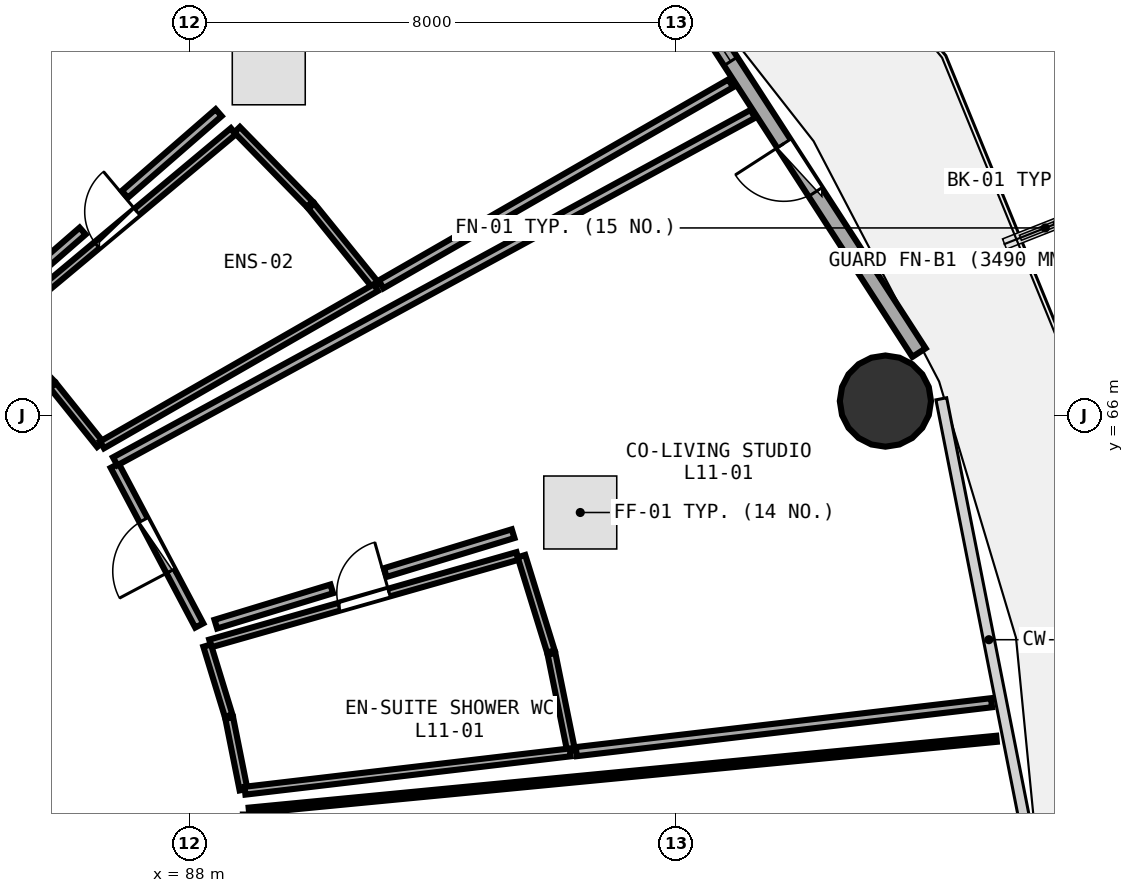
"""IFC4 building model, lengths in metres.
Left out: names, types, materials, properties, quantities, classifications, styles, units other than length and angle.
Written with IfcOpenShell. Run it as: python <this file> out.ifc"""

import sys

from ifc_helpers import new_model, si_unit, direction, frame, frame_2d, origin, origin_2d, place, context, subcontext, project, spatial, rectangle, circle, extrude, element, fill, save


model = new_model("IFC4")
c1 = context("Model", 3, precision=1e-05, world=origin(), true_north=direction((0.0, 1.0)))
c2 = subcontext(c1, "Body", "Model", "MODEL_VIEW")
j1 = project(units=[si_unit("LENGTHUNIT", "METRE"), si_unit("PLANEANGLEUNIT", "RADIAN")], contexts=[c1])
p1 = place(None, origin())
s1 = spatial("IfcSite", under=j1, at=p1, CompositionType="ELEMENT")
p2 = place(p1, origin())
s2 = spatial("IfcBuilding", under=s1, at=p2, CompositionType="ELEMENT")
p3 = place(p2, frame((0.0, 0.0, 45.0)))
s3 = spatial("IfcBuildingStorey", under=s2, at=p3, CompositionType="ELEMENT", Elevation=45.0)
p4 = place(p3, frame((99.447, 66.236, 0.0), z_axis=(0.0, 0.0, 1.0), x_axis=(1.0, 0.0, 0.0)))
e1 = element("IfcColumn", 1, at=p4, inside=s3, PredefinedType="COLUMN", context=c2, shape_type="SweptSolid", body=[
    extrude(circle(Radius=0.75, at=origin_2d()), origin(), (0.0, 0.0, 1.0), 3.75),
])
p5 = place(p3, frame((99.999, 67.033, 0.0), z_axis=(0.0, 0.0, 1.0), x_axis=(-0.543005114258, 0.839729388488, 0.0)))
e2 = element("IfcWall", 2, at=p5, inside=s3, PredefinedType="SOLIDWALL", context=c2, shape_type="SweptSolid", body=[
    extrude(rectangle(XDim=7.938, YDim=0.26, at=frame_2d((3.969, 0.0))), origin(), (0.0, 0.0, 1.0), 3.475),
])
p6 = place(p5, frame((3.144, 0.0, 0.0)))
e3 = element("IfcOpeningElement", 3, at=p6, cuts=e2, PredefinedType="OPENING", context=c2, shape_type="SweptSolid", body=[
    extrude(rectangle(XDim=0.95, YDim=2.1, at=frame_2d((0.475, 1.05))), frame((0.0, 0.14, 0.0), z_axis=(0.0, -1.0, 0.0), x_axis=(1.0, 0.0, 0.0)), (0.0, 0.0, 1.0), 0.28),
])
p7 = place(p5, frame((5.704, 0.0, 0.85)))
e4 = element("IfcOpeningElement", 4, at=p7, cuts=e2, PredefinedType="OPENING", context=c2, shape_type="SweptSolid", body=[
    extrude(rectangle(XDim=1.2, YDim=1.45, at=frame_2d((0.6, 0.725))), frame((0.0, 0.14, 0.0), z_axis=(0.0, -1.0, 0.0), x_axis=(1.0, 0.0, 0.0)), (0.0, 0.0, 1.0), 0.28),
])
p8 = place(p3, frame((88.344, 62.25, 0.0), z_axis=(0.0, 0.0, 1.0), x_axis=(0.961805744602, 0.273732916636, 0.0)))
e5 = element("IfcWall", 5, at=p8, inside=s3, PredefinedType="PLUMBINGWALL", context=c2, shape_type="SweptSolid", body=[
    extrude(rectangle(XDim=5.254, YDim=0.13, at=frame_2d((2.627, 0.0))), origin(), (0.0, 0.0, 1.0), 3.175),
])
p9 = place(p8, frame((2.197, 0.0, 0.0)))
e6 = element("IfcOpeningElement", 6, at=p9, cuts=e5, PredefinedType="OPENING", context=c2, shape_type="SweptSolid", body=[
    extrude(rectangle(XDim=0.86, YDim=2.05, at=frame_2d((0.43, 1.025))), frame((0.0, 0.075, 0.0), z_axis=(0.0, -1.0, 0.0), x_axis=(1.0, 0.0, 0.0)), (0.0, 0.0, 1.0), 0.15),
])
p10 = place(p3, frame((88.162, 62.546, 0.0), z_axis=(0.0, 0.0, 1.0), x_axis=(-0.467566881753, 0.883957697567, 0.0)))
e7 = element("IfcWall", 7, at=p10, inside=s3, PredefinedType="PARTITIONING", context=c2, shape_type="SweptSolid", body=[
    extrude(rectangle(XDim=2.972, YDim=0.15, at=frame_2d((1.486, 0.0))), origin(), (0.0, 0.0, 1.0), 2.875),
])
p11 = place(p10, frame((1.011, 0.0, 0.0)))
e8 = element("IfcOpeningElement", 8, at=p11, cuts=e7, PredefinedType="OPENING", context=c2, shape_type="SweptSolid", body=[
    extrude(rectangle(XDim=0.95, YDim=2.08, at=frame_2d((0.475, 1.04))), frame((0.0, 0.085, 0.0), z_axis=(0.0, -1.0, 0.0), x_axis=(1.0, 0.0, 0.0)), (0.0, 0.0, 1.0), 0.17),
])
p12 = place(p3, frame((84.892, 67.475, 0.0), z_axis=(0.0, 0.0, 1.0), x_axis=(0.767551433238, 0.64098736129, 0.0)))
e9 = element("IfcWall", 9, at=p12, inside=s3, PredefinedType="PLUMBINGWALL", context=c2, shape_type="SweptSolid", body=[
    extrude(rectangle(XDim=4.992, YDim=0.13, at=frame_2d((2.496, 0.0))), origin(), (0.0, 0.0, 1.0), 3.175),
])
p13 = place(p12, frame((2.066, 0.0, 0.0)))
e10 = element("IfcOpeningElement", 10, at=p13, cuts=e9, PredefinedType="OPENING", context=c2, shape_type="SweptSolid", body=[
    extrude(rectangle(XDim=0.86, YDim=2.05, at=frame_2d((0.43, 1.025))), frame((0.0, 0.075, 0.0), z_axis=(0.0, -1.0, 0.0), x_axis=(1.0, 0.0, 0.0)), (0.0, 0.0, 1.0), 0.15),
])
p14 = place(p3, frame((88.89, 59.846, 0.0), z_axis=(0.0, 0.0, 1.0), x_axis=(-0.195959765133, 0.980611936726, 0.0)))
e11 = element("IfcWall", 11, at=p14, inside=s3, PredefinedType="PLUMBINGWALL", context=c2, shape_type="SweptSolid", body=[
    extrude(rectangle(XDim=1.201, YDim=0.13, at=frame_2d((0.601, 0.0))), origin(), (0.0, 0.0, 1.0), 3.48),
])
p15 = place(p3, frame((88.645, 61.062, 0.0), z_axis=(0.0, 0.0, 1.0), x_axis=(-0.292804953119, 0.956172191307, 0.0)))
e12 = element("IfcWall", 12, at=p15, inside=s3, PredefinedType="PLUMBINGWALL", context=c2, shape_type="SweptSolid", body=[
    extrude(rectangle(XDim=1.206, YDim=0.13, at=frame_2d((0.603, 0.0))), origin(), (0.0, 0.0, 1.0), 3.48),
])
p16 = place(p3, frame((93.461, 63.686, 0.0), z_axis=(0.0, 0.0, 1.0), x_axis=(0.295079059694, -0.955472840289, 0.0)))
e13 = element("IfcWall", 13, at=p16, inside=s3, PredefinedType="PLUMBINGWALL", context=c2, shape_type="SweptSolid", body=[
    extrude(rectangle(XDim=1.641, YDim=0.13, at=frame_2d((0.82, 0.0))), origin(), (0.0, 0.0, 1.0), 3.48),
])
p17 = place(p3, frame((93.955, 62.079, 0.0), z_axis=(0.0, 0.0, 1.0), x_axis=(0.198619685617, -0.980076640108, 0.0)))
e14 = element("IfcWall", 14, at=p17, inside=s3, PredefinedType="PLUMBINGWALL", context=c2, shape_type="SweptSolid", body=[
    extrude(rectangle(XDim=1.631, YDim=0.13, at=frame_2d((0.815, 0.0))), origin(), (0.0, 0.0, 1.0), 3.48),
])
p18 = place(p3, frame((94.263, 60.459, 0.0), z_axis=(0.0, 0.0, 1.0), x_axis=(-0.993128310231, -0.117030591804, 0.0)))
e15 = element("IfcWall", 15, at=p18, inside=s3, PredefinedType="PLUMBINGWALL", context=c2, shape_type="SweptSolid", body=[
    extrude(rectangle(XDim=5.386, YDim=0.13, at=frame_2d((2.693, 0.0))), origin(), (0.0, 0.0, 1.0), 3.175),
])
p19 = place(p3, frame((86.779, 65.245, 0.0), z_axis=(0.0, 0.0, 1.0), x_axis=(0.878114235828, 0.478451030761, 0.0)))
e16 = element("IfcWall", 16, at=p19, inside=s3, PredefinedType="PARTITIONING", context=c2, shape_type="SweptSolid", body=[
    extrude(rectangle(XDim=11.942, YDim=0.15, at=frame_2d((5.971, 0.0))), origin(), (0.0, 0.0, 1.0), 2.875),
])
p20 = place(p3, frame((101.192, 61.275, 0.0), z_axis=(0.0, 0.0, 1.0), x_axis=(-0.993130233211, -0.117014272133, 0.0)))
e17 = element("IfcWall", 17, at=p20, inside=s3, PredefinedType="PARTITIONING", context=c2, shape_type="SweptSolid", body=[
    extrude(rectangle(XDim=6.877, YDim=0.15, at=frame_2d((3.438, 0.0))), origin(), (0.0, 0.0, 1.0), 2.875),
])
p21 = place(p3, frame((93.324, 64.055, 0.0), z_axis=(0.0, 0.0, 1.0), x_axis=(-0.956656385618, -0.291219092533, 0.0)))
e18 = element("IfcWall", 18, at=p21, inside=s3, PredefinedType="PARTITIONING", context=c2, shape_type="SweptSolid", body=[
    extrude(rectangle(XDim=2.197, YDim=0.15, at=frame_2d((1.099, 0.0))), origin(), (0.0, 0.0, 1.0), 3.175),
])
p22 = place(p3, frame((90.341, 63.148, 0.0), z_axis=(0.0, 0.0, 1.0), x_axis=(-0.956672396934, -0.291166490078, 0.0)))
e19 = element("IfcWall", 19, at=p22, inside=s3, PredefinedType="PARTITIONING", context=c2, shape_type="SweptSolid", body=[
    extrude(rectangle(XDim=1.993, YDim=0.15, at=frame_2d((0.997, 0.0))), origin(), (0.0, 0.0, 1.0), 3.235),
])
p23 = place(p3, frame((86.533, 65.521, 0.0), z_axis=(0.0, 0.0, 1.0), x_axis=(-0.625509784914, 0.780216321912, 0.0)))
e20 = element("IfcWall", 20, at=p23, inside=s3, PredefinedType="PLUMBINGWALL", context=c2, shape_type="SweptSolid", body=[
    extrude(rectangle(XDim=1.242, YDim=0.13, at=frame_2d((0.621, 0.0))), origin(), (0.0, 0.0, 1.0), 2.875),
])
p24 = place(p3, frame((85.73, 66.521, 0.0), z_axis=(0.0, 0.0, 1.0), x_axis=(-0.694622338853, 0.719374593913, 0.0)))
e21 = element("IfcWall", 21, at=p24, inside=s3, PredefinedType="PLUMBINGWALL", context=c2, shape_type="SweptSolid", body=[
    extrude(rectangle(XDim=1.253, YDim=0.13, at=frame_2d((0.626, 0.0))), origin(), (0.0, 0.0, 1.0), 2.875),
])
p25 = place(p3, frame((88.784, 70.699, 0.0), z_axis=(0.0, 0.0, 1.0), x_axis=(0.698493231478, -0.715616661055, 0.0)))
e22 = element("IfcWall", 22, at=p25, inside=s3, PredefinedType="PLUMBINGWALL", context=c2, shape_type="SweptSolid", body=[
    extrude(rectangle(XDim=1.711, YDim=0.13, at=frame_2d((0.855, 0.0))), origin(), (0.0, 0.0, 1.0), 2.875),
])
p26 = place(p3, frame((90.006, 69.445, 0.0), z_axis=(0.0, 0.0, 1.0), x_axis=(0.629707963092, -0.776831951723, 0.0)))
e23 = element("IfcWall", 23, at=p26, inside=s3, PredefinedType="PLUMBINGWALL", context=c2, shape_type="SweptSolid", body=[
    extrude(rectangle(XDim=1.694, YDim=0.13, at=frame_2d((0.847, 0.0))), origin(), (0.0, 0.0, 1.0), 3.175),
])
p27 = place(p3, frame((91.068, 68.103, 0.0), z_axis=(0.0, 0.0, 1.0), x_axis=(-0.867165143158, -0.498020696851, 0.0)))
e24 = element("IfcWall", 24, at=p27, inside=s3, PredefinedType="PLUMBINGWALL", context=c2, shape_type="SweptSolid", body=[
    extrude(rectangle(XDim=5.194, YDim=0.13, at=frame_2d((2.597, 0.0))), origin(), (0.0, 0.0, 1.0), 2.875),
])
p28 = place(p3, frame((82.049, 69.557, 0.0), z_axis=(0.0, 0.0, 1.0), x_axis=(0.586718941426, 0.809790641939, 0.0)))
e25 = element("IfcWall", 25, at=p28, inside=s3, PredefinedType="PARTITIONING", context=c2, shape_type="SweptSolid", body=[
    extrude(rectangle(XDim=11.249, YDim=0.15, at=frame_2d((5.625, 0.0))), origin(), (0.0, 0.0, 1.0), 2.875),
])
p29 = place(p3, frame((96.903, 71.461, 0.0), z_axis=(0.0, 0.0, 1.0), x_axis=(-0.866924194656, -0.498440007142, 0.0)))
e26 = element("IfcWall", 26, at=p29, inside=s3, PredefinedType="PARTITIONING", context=c2, shape_type="SweptSolid", body=[
    extrude(rectangle(XDim=6.634, YDim=0.15, at=frame_2d((3.317, 0.0))), origin(), (0.0, 0.0, 1.0), 2.875),
])
p30 = place(p3, frame((88.481, 70.979, 0.0), z_axis=(0.0, 0.0, 1.0), x_axis=(-0.754356172394, -0.656465357176, 0.0)))
e27 = element("IfcWall", 27, at=p30, inside=s3, PredefinedType="PARTITIONING", context=c2, shape_type="SweptSolid", body=[
    extrude(rectangle(XDim=2.045, YDim=0.15, at=frame_2d((1.022, 0.0))), origin(), (0.0, 0.0, 1.0), 3.175),
])
p31 = place(p3, frame((86.244, 69.032, 0.0), z_axis=(0.0, 0.0, 1.0), x_axis=(-0.754351792987, -0.656470389597, 0.0)))
e28 = element("IfcWall", 28, at=p31, inside=s3, PredefinedType="PARTITIONING", context=c2, shape_type="SweptSolid", body=[
    extrude(rectangle(XDim=2.093, YDim=0.15, at=frame_2d((1.046, 0.0))), origin(), (0.0, 0.0, 1.0), 3.235),
])
p32 = place(p3, frame((88.979, 59.5, 0.0), z_axis=(0.0, 0.0, 1.0), x_axis=(0.995408087514, 0.095722198638, 0.0)))
e29 = element("IfcWall", 29, at=p32, inside=s3, PredefinedType="PARTITIONING", context=c2, shape_type="SweptSolid", body=[
    extrude(rectangle(XDim=12.352, YDim=0.1, at=frame_2d((6.176, 0.0))), origin(), (0.0, 0.0, 1.0), 2.875),
])
p33 = place(p6, frame((0.95, 0.0, 0.0), z_axis=(0.0, 0.0, 1.0), x_axis=(-1.0, 0.0, 0.0)))
e30 = element("IfcDoor", 30, at=p33, inside=s3, OperationType="SINGLE_SWING_LEFT", PredefinedType="DOOR", context=c2, shape_type="SweptSolid", body=[
    extrude(rectangle(XDim=0.95, YDim=2.1, at=frame_2d((0.475, 1.05))), frame((0.0, 0.025, 0.0), z_axis=(0.0, -1.0, 0.0), x_axis=(1.0, 0.0, 0.0)), (0.0, 0.0, 1.0), 0.05),
])
fill(e3, e30)
p34 = place(p7, origin())
e31 = element("IfcWindow", 31, at=p34, inside=s3, PartitioningType="SINGLE_PANEL", PredefinedType="WINDOW", context=c2, shape_type="SweptSolid", body=[
    extrude(rectangle(XDim=1.2, YDim=1.45, at=frame_2d((0.6, 0.725))), frame((0.0, 0.03, 0.0), z_axis=(0.0, -1.0, 0.0), x_axis=(1.0, 0.0, 0.0)), (0.0, 0.0, 1.0), 0.06),
])
fill(e4, e31)
p35 = place(p9, origin())
e32 = element("IfcDoor", 32, at=p35, inside=s3, OperationType="SINGLE_SWING_RIGHT", PredefinedType="DOOR", context=c2, shape_type="SweptSolid", body=[
    extrude(rectangle(XDim=0.86, YDim=2.05, at=frame_2d((0.43, 1.025))), frame((0.0, 0.025, 0.0), z_axis=(0.0, -1.0, 0.0), x_axis=(1.0, 0.0, 0.0)), (0.0, 0.0, 1.0), 0.05),
])
fill(e6, e32)
p36 = place(p11, origin())
e33 = element("IfcDoor", 33, at=p36, inside=s3, OperationType="SINGLE_SWING_LEFT", PredefinedType="DOOR", context=c2, shape_type="SweptSolid", body=[
    extrude(rectangle(XDim=0.95, YDim=2.08, at=frame_2d((0.475, 1.04))), frame((0.0, 0.025, 0.0), z_axis=(0.0, -1.0, 0.0), x_axis=(1.0, 0.0, 0.0)), (0.0, 0.0, 1.0), 0.05),
])
fill(e8, e33)
p37 = place(p13, origin())
e34 = element("IfcDoor", 34, at=p37, inside=s3, OperationType="SINGLE_SWING_RIGHT", PredefinedType="DOOR", context=c2, shape_type="SweptSolid", body=[
    extrude(rectangle(XDim=0.86, YDim=2.05, at=frame_2d((0.43, 1.025))), frame((0.0, 0.025, 0.0), z_axis=(0.0, -1.0, 0.0), x_axis=(1.0, 0.0, 0.0)), (0.0, 0.0, 1.0), 0.05),
])
fill(e10, e34)
save(model, sys.argv[1])
